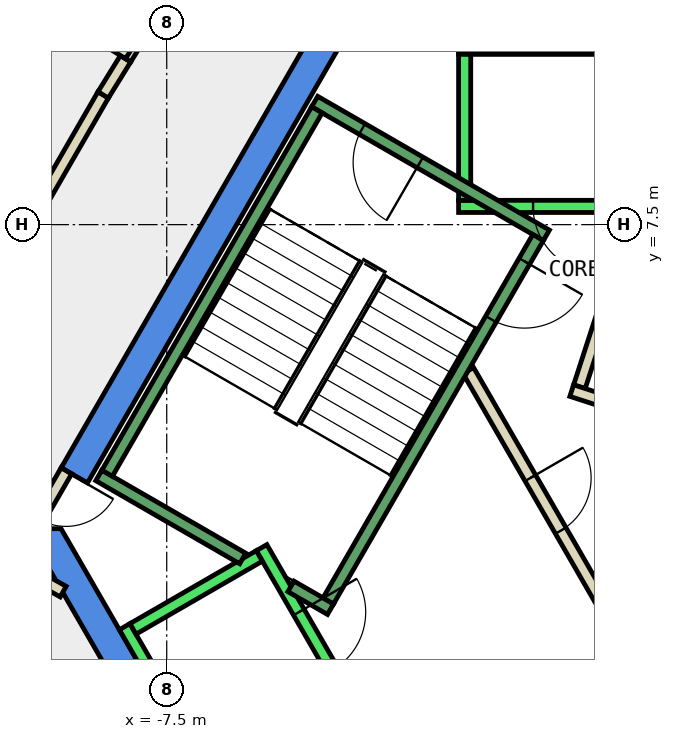
"""IFC4 building model, lengths in metres.
Left out: names, types, materials, properties, quantities, classifications, styles, units other than length and angle.
Written with IfcOpenShell. Run it as: python <this file> out.ifc"""

import sys

from ifc_helpers import new_model, si_unit, direction, frame, frame_2d, origin, place, context, subcontext, project, spatial, polyline, rectangle, outline, extrude, element, fill, save


model = new_model("IFC4")
c1 = context("Model", 3, precision=1e-05, world=origin(), true_north=direction((0.0, 1.0)))
c2 = subcontext(c1, "Body", "Model", "MODEL_VIEW")
j1 = project(units=[si_unit("LENGTHUNIT", "METRE"), si_unit("PLANEANGLEUNIT", "RADIAN")], contexts=[c1])
p1 = place(None, origin())
s1 = spatial("IfcSite", under=j1, at=p1, CompositionType="ELEMENT")
p2 = place(p1, origin())
s2 = spatial("IfcBuilding", under=s1, at=p2, CompositionType="ELEMENT")
p3 = place(p2, frame((0.0, 0.0, 304.4)))
s3 = spatial("IfcBuildingStorey", under=s2, at=p3, CompositionType="ELEMENT", Elevation=304.4)
p4 = place(p3, frame((0.0, 0.0, -0.34)))
e1 = element("IfcWall", 1, at=p4, inside=s3, PredefinedType="SHEAR", context=c2, shape_type="SweptSolid", body=[
    extrude(outline(polyline([(-9.236, 3.502), (-8.803, 3.253), (-4.619, 10.5), (-4.907, 11.0), (-9.236, 3.502)])), origin(), (0.0, 0.0, 1.0), 3.6),
])
p5 = place(p3, frame((0.0, 0.0, -0.34)))
e2 = element("IfcWall", 2, at=p5, inside=s3, PredefinedType="SHEAR", context=c2, shape_type="SweptSolid", body=[
    extrude(outline(polyline([(-9.815, 2.5), (-4.907, -6.0), (-4.619, -5.5), (-9.238, 2.5), (-9.815, 2.5)])), origin(), (0.0, 0.0, 1.0), 3.6),
])
p6 = place(p3, frame((-0.157, 6.547, 0.0), z_axis=(0.0, 0.0, 1.0), x_axis=(-0.308813127339, -0.951122732555, 0.0)))
e3 = element("IfcWall", 3, at=p6, inside=s3, PredefinedType="PARTITIONING", context=c2, shape_type="SweptSolid", body=[
    extrude(rectangle(XDim=1.8, YDim=0.2, at=frame_2d((0.9, 0.0))), origin(), (0.0, 0.0, 1.0), 3.26),
])
p7 = place(p3, frame((-0.839, 4.771, 0.0), z_axis=(0.0, 0.0, 1.0), x_axis=(0.950961084355, -0.309310549515, 0.0)))
e4 = element("IfcWall", 4, at=p7, inside=s3, PredefinedType="PARTITIONING", context=c2, shape_type="SweptSolid", body=[
    extrude(rectangle(XDim=3.0, YDim=0.2, at=frame_2d((1.5, 0.0))), origin(), (0.0, 0.0, 1.0), 3.26),
])
p8 = place(p7, frame((1.05, 0.0, 0.0)))
e5 = element("IfcOpeningElement", 5, at=p8, cuts=e4, PredefinedType="OPENING", context=c2, shape_type="SweptSolid", body=[
    extrude(rectangle(XDim=0.9, YDim=2.1, at=frame_2d((0.45, 1.05))), frame((0.0, 0.11, 0.0), z_axis=(0.0, -1.0, 0.0), x_axis=(1.0, 0.0, 0.0)), (0.0, 0.0, 1.0), 0.22),
])
p9 = place(p3, frame((-9.203, 1.465, 0.0), z_axis=(0.0, 0.0, 1.0), x_axis=(-0.872243753731, 0.489071399775, 0.0)))
e6 = element("IfcWall", 6, at=p9, inside=s3, PredefinedType="PARTITIONING", context=c2, shape_type="SweptSolid", body=[
    extrude(rectangle(XDim=1.715, YDim=0.2, at=frame_2d((0.858, 0.0))), origin(), (0.0, 0.0, 1.0), 3.26),
])
p10 = place(p3, frame((-10.543, 6.174, 0.0), z_axis=(0.0, 0.0, 1.0), x_axis=(0.50008212199, 0.86597798544, 0.0)))
e7 = element("IfcWall", 7, at=p10, inside=s3, PredefinedType="PARTITIONING", context=c2, shape_type="SweptSolid", body=[
    extrude(rectangle(XDim=3.995, YDim=0.2, at=frame_2d((1.998, 0.0))), origin(), (0.0, 0.0, 1.0), 3.26),
])
p11 = place(p3, frame((-8.545, 9.634, 0.0), z_axis=(0.0, 0.0, 1.0), x_axis=(0.52594604986, 0.85051793199, 0.0)))
e8 = element("IfcWall", 8, at=p11, inside=s3, PredefinedType="PARTITIONING", context=c2, shape_type="SweptSolid", body=[
    extrude(rectangle(XDim=0.699, YDim=0.2, at=frame_2d((0.35, 0.0))), origin(), (0.0, 0.0, 1.0), 3.26),
])
p12 = place(p3, frame((-8.177, 10.229, 0.0), z_axis=(0.0, 0.0, 1.0), x_axis=(0.526504295939, 0.850172468595, 0.0)))
e9 = element("IfcWall", 9, at=p12, inside=s3, PredefinedType="PARTITIONING", context=c2, shape_type="SweptSolid", body=[
    extrude(rectangle(XDim=3.2, YDim=0.2, at=frame_2d((1.6, 0.0))), origin(), (0.0, 0.0, 1.0), 3.26),
])
p13 = place(p3, frame((-0.982, -1.0, 0.0), z_axis=(0.0, 0.0, 1.0), x_axis=(0.50024047865, 0.865886518847, 0.0)))
e10 = element("IfcWall", 10, at=p13, inside=s3, PredefinedType="PARTITIONING", context=c2, shape_type="SweptSolid", body=[
    extrude(rectangle(XDim=1.863, YDim=0.2, at=frame_2d((0.931, 0.0))), origin(), (0.0, 0.0, 1.0), 3.26),
])
p14 = place(p3, frame((-2.54, 5.1, 0.0), z_axis=(0.0, 0.0, 1.0), x_axis=(0.499925051871, -0.866068670783, 0.0)))
e11 = element("IfcWall", 11, at=p14, inside=s3, PredefinedType="PARTITIONING", context=c2, shape_type="SweptSolid", body=[
    extrude(rectangle(XDim=5.181, YDim=0.2, at=frame_2d((2.59, 0.0))), origin(), (0.0, 0.0, 1.0), 3.26),
])
p15 = place(p14, frame((2.04, 0.0, 0.0)))
e12 = element("IfcOpeningElement", 12, at=p15, cuts=e11, PredefinedType="OPENING", context=c2, shape_type="SweptSolid", body=[
    extrude(rectangle(XDim=1.0, YDim=2.1, at=frame_2d((0.5, 1.05))), frame((0.0, 0.11, 0.0), z_axis=(0.0, -1.0, 0.0), x_axis=(1.0, 0.0, 0.0)), (0.0, 0.0, 1.0), 0.22),
])
p16 = place(p3, frame((-10.42, 11.736, 0.0), z_axis=(0.0, 0.0, 1.0), x_axis=(0.850124477172, -0.52658178217, 0.0)))
e13 = element("IfcWall", 13, at=p16, inside=s3, PredefinedType="PARTITIONING", context=c2, shape_type="SweptSolid", body=[
    extrude(rectangle(XDim=2.701, YDim=0.2, at=frame_2d((1.35, 0.0))), origin(), (0.0, 0.0, 1.0), 3.26),
])
p17 = place(p3, frame((-9.15, 3.452, 0.0), z_axis=(0.0, 0.0, 1.0), x_axis=(-0.500079945886, -0.865979242085, 0.0)))
e14 = element("IfcWall", 14, at=p17, inside=s3, PredefinedType="PARTITIONING", context=c2, shape_type="SweptSolid", body=[
    extrude(rectangle(XDim=0.926, YDim=0.2, at=frame_2d((0.463, 0.0))), origin(), (0.0, 0.0, 1.0), 2.4),
])
p18 = place(p17, frame((0.017, 0.0, 0.0)))
e15 = element("IfcOpeningElement", 15, at=p18, cuts=e14, PredefinedType="OPENING", context=c2, shape_type="SweptSolid", body=[
    extrude(rectangle(XDim=0.9, YDim=2.1, at=frame_2d((0.45, 1.05))), frame((0.0, 0.11, 0.0), z_axis=(0.0, -1.0, 0.0), x_axis=(1.0, 0.0, 0.0)), (0.0, 0.0, 1.0), 0.22),
])
p19 = place(p3, frame((2.7, 7.8, 0.0), z_axis=(0.0, 0.0, 1.0), x_axis=(-1.0, 0.0, 0.0)))
e16 = element("IfcWall", 16, at=p19, inside=s3, PredefinedType="STANDARD", context=c2, shape_type="SweptSolid", body=[
    extrude(rectangle(XDim=5.4, YDim=0.2, at=frame_2d((2.7, 0.0))), origin(), (0.0, 0.0, 1.0), 3.26),
])
p20 = place(p19, frame((1.225, 0.0, 0.0)))
e17 = element("IfcOpeningElement", 17, at=p20, cuts=e16, PredefinedType="OPENING", context=c2, shape_type="SweptSolid", body=[
    extrude(rectangle(XDim=1.1, YDim=2.1, at=frame_2d((0.55, 1.05))), frame((0.0, 0.11, 0.0), z_axis=(0.0, -1.0, 0.0), x_axis=(1.0, 0.0, 0.0)), (0.0, 0.0, 1.0), 0.22),
])
p21 = place(p19, frame((3.075, 0.0, 0.0)))
e18 = element("IfcOpeningElement", 18, at=p21, cuts=e16, PredefinedType="OPENING", context=c2, shape_type="SweptSolid", body=[
    extrude(rectangle(XDim=1.1, YDim=2.1, at=frame_2d((0.55, 1.05))), frame((0.0, 0.11, 0.0), z_axis=(0.0, -1.0, 0.0), x_axis=(1.0, 0.0, 0.0)), (0.0, 0.0, 1.0), 0.22),
])
p22 = place(p3, frame((2.7, 10.4, 0.0), z_axis=(0.0, 0.0, 1.0), x_axis=(-1.0, 0.0, 0.0)))
e19 = element("IfcWall", 19, at=p22, inside=s3, PredefinedType="STANDARD", context=c2, shape_type="SweptSolid", body=[
    extrude(rectangle(XDim=5.4, YDim=0.2, at=frame_2d((2.7, 0.0))), origin(), (0.0, 0.0, 1.0), 3.26),
])
p23 = place(p3, frame((-2.6, 7.9, 0.0), z_axis=(0.0, 0.0, 1.0), x_axis=(0.0, 1.0, 0.0)))
e20 = element("IfcWall", 20, at=p23, inside=s3, PredefinedType="STANDARD", context=c2, shape_type="SweptSolid", body=[
    extrude(rectangle(XDim=2.4, YDim=0.2, at=frame_2d((1.2, 0.0))), origin(), (0.0, 0.0, 1.0), 3.26),
])
p24 = place(p3, frame((-5.94, 2.188, 0.0), z_axis=(0.0, 0.0, 1.0), x_axis=(0.500034260056, -0.866005622828, 0.0)))
e21 = element("IfcWall", 21, at=p24, inside=s3, PredefinedType="STANDARD", context=c2, shape_type="SweptSolid", body=[
    extrude(rectangle(XDim=5.399, YDim=0.2, at=frame_2d((2.7, 0.0))), origin(), (0.0, 0.0, 1.0), 3.26),
])
p25 = place(p24, frame((3.075, 0.0, 0.0)))
e22 = element("IfcOpeningElement", 22, at=p25, cuts=e21, PredefinedType="OPENING", context=c2, shape_type="SweptSolid", body=[
    extrude(rectangle(XDim=1.1, YDim=2.1, at=frame_2d((0.55, 1.05))), frame((0.0, 0.11, 0.0), z_axis=(0.0, -1.0, 0.0), x_axis=(1.0, 0.0, 0.0)), (0.0, 0.0, 1.0), 0.22),
])
p26 = place(p24, frame((1.225, 0.0, 0.0)))
e23 = element("IfcOpeningElement", 23, at=p26, cuts=e21, PredefinedType="OPENING", context=c2, shape_type="SweptSolid", body=[
    extrude(rectangle(XDim=1.1, YDim=2.1, at=frame_2d((0.55, 1.05))), frame((0.0, 0.11, 0.0), z_axis=(0.0, -1.0, 0.0), x_axis=(1.0, 0.0, 0.0)), (0.0, 0.0, 1.0), 0.22),
])
p27 = place(p3, frame((-8.192, 0.888, 0.0), z_axis=(0.0, 0.0, 1.0), x_axis=(0.500034260056, -0.866005622828, 0.0)))
e24 = element("IfcWall", 24, at=p27, inside=s3, PredefinedType="STANDARD", context=c2, shape_type="SweptSolid", body=[
    extrude(rectangle(XDim=5.399, YDim=0.2, at=frame_2d((2.7, 0.0))), origin(), (0.0, 0.0, 1.0), 3.26),
])
p28 = place(p3, frame((-5.977, 2.052, 0.0), z_axis=(0.0, 0.0, 1.0), x_axis=(-0.865973769406, -0.500089422704, 0.0)))
e25 = element("IfcWall", 25, at=p28, inside=s3, PredefinedType="STANDARD", context=c2, shape_type="SweptSolid", body=[
    extrude(rectangle(XDim=2.399, YDim=0.2, at=frame_2d((1.2, 0.0))), origin(), (0.0, 0.0, 1.0), 3.26),
])
p29 = place(p3, frame((-1.256, 7.324, 0.0), z_axis=(0.0, 0.0, 1.0), x_axis=(-0.866046073146, 0.499964197906, 0.0)))
e26 = element("IfcWall", 26, at=p29, inside=s3, PredefinedType="STANDARD", context=c2, shape_type="SweptSolid", body=[
    extrude(rectangle(XDim=4.4, YDim=0.2, at=frame_2d((2.2, 0.0))), origin(), (0.0, 0.0, 1.0), 3.26),
])
p30 = place(p29, frame((2.4, 0.0, 0.0)))
e27 = element("IfcOpeningElement", 27, at=p30, cuts=e26, PredefinedType="OPENING", context=c2, shape_type="SweptSolid", body=[
    extrude(rectangle(XDim=1.1, YDim=2.2, at=frame_2d((0.55, 1.1))), frame((0.0, 0.11, 0.0), z_axis=(0.0, -1.0, 0.0), x_axis=(1.0, 0.0, 0.0)), (0.0, 0.0, 1.0), 0.22),
])
p31 = place(p3, frame((-6.25, 2.01, 0.0), z_axis=(0.0, 0.0, 1.0), x_axis=(-0.86611865017, 0.499838457731, 0.0)))
e28 = element("IfcWall", 28, at=p31, inside=s3, PredefinedType="STANDARD", context=c2, shape_type="SweptSolid", body=[
    extrude(rectangle(XDim=2.733, YDim=0.2, at=frame_2d((1.366, 0.0))), origin(), (0.0, 0.0, 1.0), 3.26),
])
p32 = place(p3, frame((-4.806, 1.176, 0.0), z_axis=(0.0, 0.0, 1.0), x_axis=(-0.866558586415, 0.499075361355, 0.0)))
e29 = element("IfcWall", 29, at=p32, inside=s3, PredefinedType="STANDARD", context=c2, shape_type="SweptSolid", body=[
    extrude(rectangle(XDim=0.751, YDim=0.2, at=frame_2d((0.376, 0.0))), origin(), (0.0, 0.0, 1.0), 3.26),
])
p33 = place(p3, frame((-1.393, 7.288, 0.0), z_axis=(0.0, 0.0, 1.0), x_axis=(-0.499963383562, -0.866046543262, 0.0)))
e30 = element("IfcWall", 30, at=p33, inside=s3, PredefinedType="STANDARD", context=c2, shape_type="SweptSolid", body=[
    extrude(rectangle(XDim=6.9, YDim=0.2, at=frame_2d((3.45, 0.0))), origin(), (0.0, 0.0, 1.0), 3.26),
])
p34 = place(p33, frame((0.45, 0.0, 0.0)))
e31 = element("IfcOpeningElement", 31, at=p34, cuts=e30, PredefinedType="OPENING", context=c2, shape_type="SweptSolid", body=[
    extrude(rectangle(XDim=1.1, YDim=2.2, at=frame_2d((0.55, 1.1))), frame((0.0, 0.11, 0.0), z_axis=(0.0, -1.0, 0.0), x_axis=(1.0, 0.0, 0.0)), (0.0, 0.0, 1.0), 0.22),
])
p35 = place(p3, frame((-5.03, 9.388, 0.0), z_axis=(0.0, 0.0, 1.0), x_axis=(-0.499978703459, -0.866037698999, 0.0)))
e32 = element("IfcWall", 32, at=p35, inside=s3, PredefinedType="STANDARD", context=c2, shape_type="SweptSolid", body=[
    extrude(rectangle(XDim=6.9, YDim=0.2, at=frame_2d((3.45, 0.0))), origin(), (0.0, 0.0, 1.0), 3.26),
])
p36 = place(p15, origin())
e33 = element("IfcDoor", 33, at=p36, inside=s3, OperationType="SINGLE_SWING_RIGHT", PredefinedType="DOOR", context=c2, shape_type="SweptSolid", body=[
    extrude(rectangle(XDim=1.0, YDim=2.1, at=frame_2d((0.5, 1.05))), frame((0.0, 0.025, 0.0), z_axis=(0.0, -1.0, 0.0), x_axis=(1.0, 0.0, 0.0)), (0.0, 0.0, 1.0), 0.05),
])
fill(e12, e33)
p37 = place(p18, origin())
e34 = element("IfcDoor", 34, at=p37, inside=s3, OperationType="SINGLE_SWING_LEFT", PredefinedType="DOOR", context=c2, shape_type="SweptSolid", body=[
    extrude(rectangle(XDim=0.9, YDim=2.1, at=frame_2d((0.45, 1.05))), frame((0.0, 0.025, 0.0), z_axis=(0.0, -1.0, 0.0), x_axis=(1.0, 0.0, 0.0)), (0.0, 0.0, 1.0), 0.05),
])
fill(e15, e34)
p38 = place(p21, origin())
e35 = element("IfcDoor", 35, at=p38, inside=s3, OperationType="SLIDING_TO_LEFT", PredefinedType="DOOR", context=c2, shape_type="SweptSolid", body=[
    extrude(rectangle(XDim=1.1, YDim=2.1, at=frame_2d((0.55, 1.05))), frame((0.0, 0.025, 0.0), z_axis=(0.0, -1.0, 0.0), x_axis=(1.0, 0.0, 0.0)), (0.0, 0.0, 1.0), 0.05),
])
fill(e18, e35)
p39 = place(p26, origin())
e36 = element("IfcDoor", 36, at=p39, inside=s3, OperationType="SLIDING_TO_LEFT", PredefinedType="DOOR", context=c2, shape_type="SweptSolid", body=[
    extrude(rectangle(XDim=1.1, YDim=2.1, at=frame_2d((0.55, 1.05))), frame((0.0, 0.025, 0.0), z_axis=(0.0, -1.0, 0.0), x_axis=(1.0, 0.0, 0.0)), (0.0, 0.0, 1.0), 0.05),
])
fill(e23, e36)
p40 = place(p34, origin())
e37 = element("IfcDoor", 37, at=p40, inside=s3, OperationType="SINGLE_SWING_LEFT", PredefinedType="DOOR", context=c2, shape_type="SweptSolid", body=[
    extrude(rectangle(XDim=1.1, YDim=2.2, at=frame_2d((0.55, 1.1))), frame((0.0, 0.025, 0.0), z_axis=(0.0, -1.0, 0.0), x_axis=(1.0, 0.0, 0.0)), (0.0, 0.0, 1.0), 0.05),
])
fill(e31, e37)
p41 = place(p30, origin())
e38 = element("IfcDoor", 38, at=p41, inside=s3, OperationType="SINGLE_SWING_LEFT", PredefinedType="DOOR", context=c2, shape_type="SweptSolid", body=[
    extrude(rectangle(XDim=1.1, YDim=2.2, at=frame_2d((0.55, 1.1))), frame((0.0, 0.025, 0.0), z_axis=(0.0, -1.0, 0.0), x_axis=(1.0, 0.0, 0.0)), (0.0, 0.0, 1.0), 0.05),
])
fill(e27, e38)
save(model, sys.argv[1])
